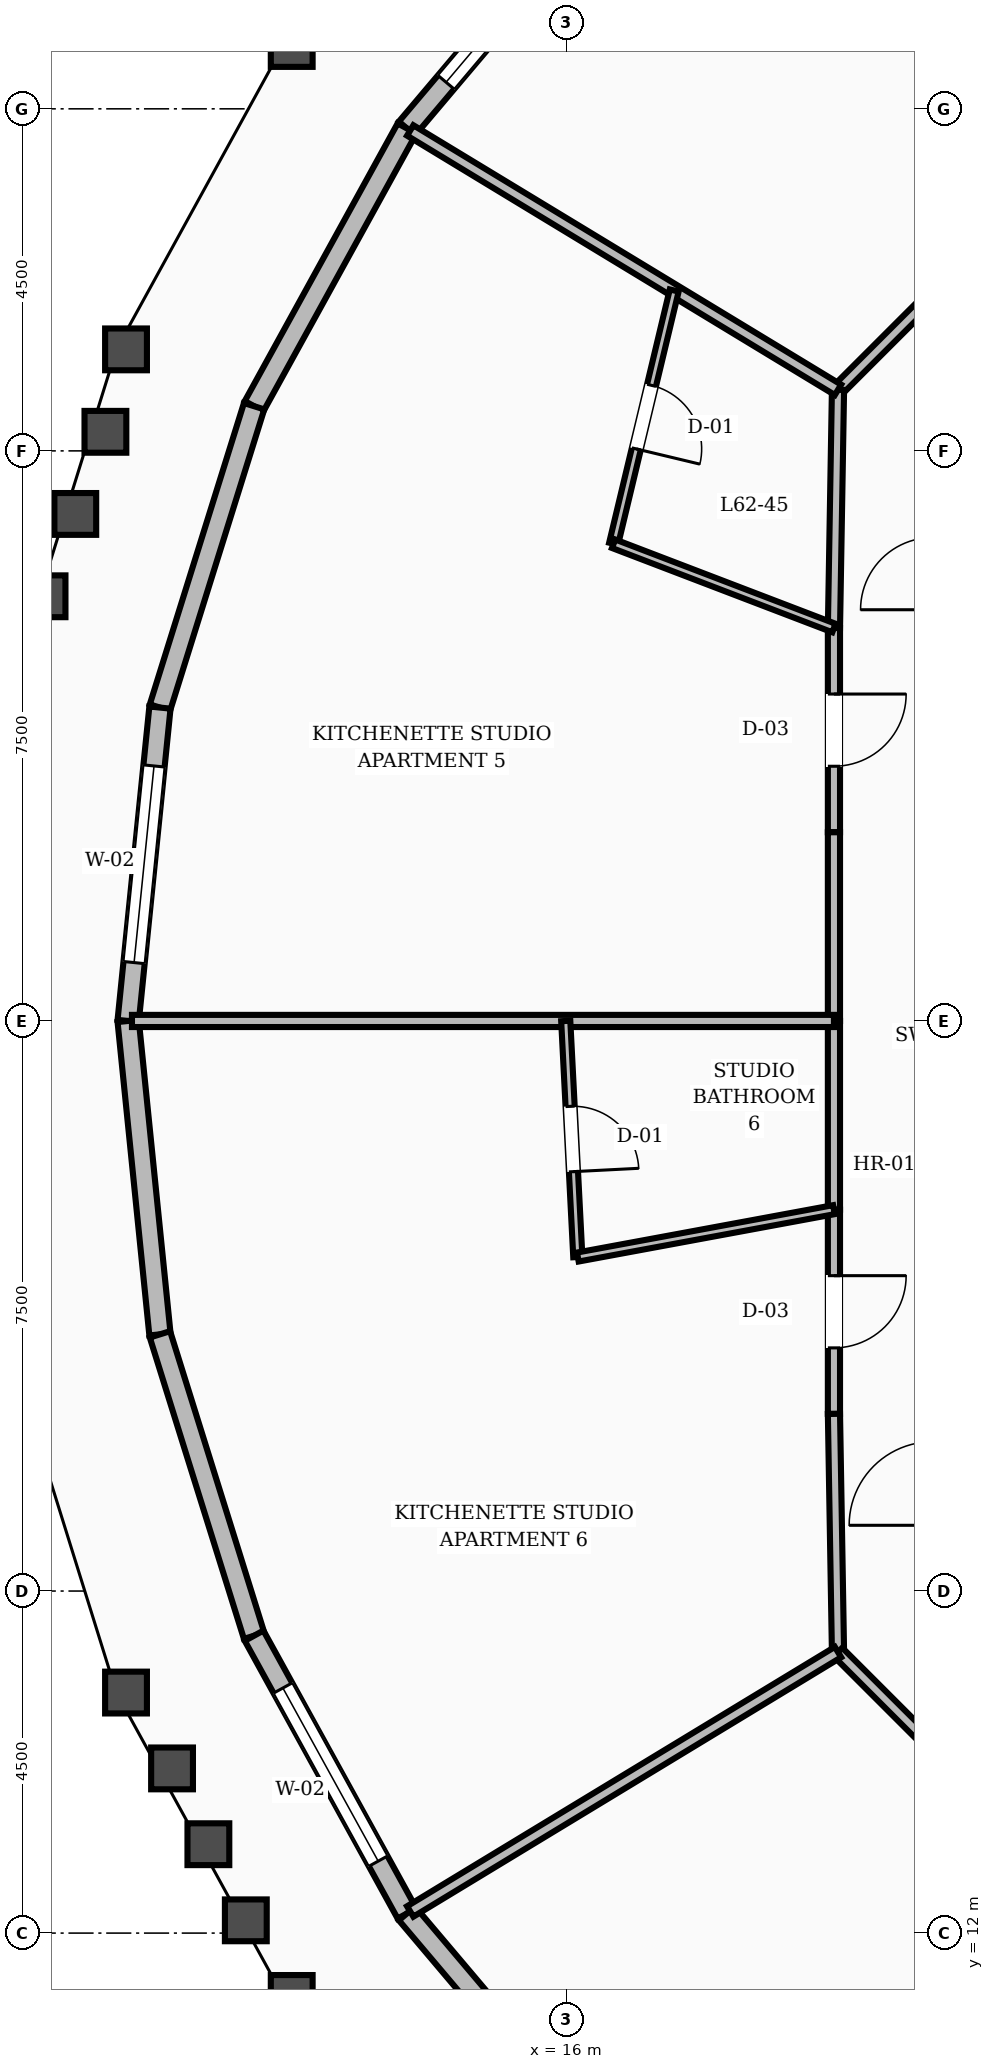
"""IFC4 building model, lengths in metres.
Left out: names, types, materials, properties, quantities, classifications, styles, units other than length and angle.
Written with IfcOpenShell. Run it as: python <this file> out.ifc"""

import sys

from ifc_helpers import new_model, si_unit, direction, frame, frame_2d, origin, place, context, subcontext, project, spatial, rectangle, extrude, element, fill, save


model = new_model("IFC4")
c1 = context("Model", 3, precision=1e-05, world=origin(), true_north=direction((0.0, 1.0)))
c2 = subcontext(c1, "Body", "Model", "MODEL_VIEW")
j1 = project(units=[si_unit("LENGTHUNIT", "METRE"), si_unit("PLANEANGLEUNIT", "RADIAN")], contexts=[c1])
p1 = place(None, origin())
s1 = spatial("IfcSite", under=j1, at=p1, CompositionType="ELEMENT")
p2 = place(p1, origin())
s2 = spatial("IfcBuilding", under=s1, at=p2, CompositionType="ELEMENT")
p3 = place(p2, frame((0.0, 0.0, 240.0)))
s3 = spatial("IfcBuildingStorey", under=s2, at=p3, CompositionType="ELEMENT", Elevation=240.0)
p4 = place(p3, frame((16.61, 38.944, 0.0), z_axis=(0.0, 0.0, 1.0), x_axis=(-0.645568939202, -0.763701999956, 0.0)))
e1 = element("IfcWall", 1, at=p4, inside=s3, PredefinedType="STANDARD", context=c2, shape_type="SweptSolid", body=[
    extrude(rectangle(XDim=4.193, YDim=0.28, at=frame_2d((2.097, 0.0))), origin(), (0.0, 0.0, 1.0), 2.88),
])
p5 = place(p4, frame((0.797, 0.0, 0.8)))
e2 = element("IfcOpeningElement", 2, at=p5, cuts=e1, PredefinedType="OPENING", context=c2, shape_type="SweptSolid", body=[
    extrude(rectangle(XDim=2.6, YDim=1.65, at=frame_2d((1.3, 0.825))), frame((0.0, 0.15, 0.0), z_axis=(0.0, -1.0, 0.0), x_axis=(1.0, 0.0, 0.0)), (0.0, 0.0, 1.0), 0.3),
])
p6 = place(p3, frame((13.903, 35.741, 0.0), z_axis=(0.0, 0.0, 1.0), x_axis=(-0.482219827967, -0.876050248282, 0.0)))
e3 = element("IfcWall", 3, at=p6, inside=s3, PredefinedType="STANDARD", context=c2, shape_type="SweptSolid", body=[
    extrude(rectangle(XDim=4.171, YDim=0.28, at=frame_2d((2.085, 0.0))), origin(), (0.0, 0.0, 1.0), 2.88),
])
p7 = place(p3, frame((11.891, 32.088, 0.0), z_axis=(0.0, 0.0, 1.0), x_axis=(-0.298184627307, -0.954508212661, 0.0)))
e4 = element("IfcWall", 4, at=p7, inside=s3, PredefinedType="STANDARD", context=c2, shape_type="SweptSolid", body=[
    extrude(rectangle(XDim=4.154, YDim=0.28, at=frame_2d((2.077, 0.0))), origin(), (0.0, 0.0, 1.0), 2.88),
])
p8 = place(p3, frame((10.653, 28.123, 0.0), z_axis=(0.0, 0.0, 1.0), x_axis=(-0.100915158401, -0.994895035069, 0.0)))
e5 = element("IfcWall", 5, at=p8, inside=s3, PredefinedType="STANDARD", context=c2, shape_type="SweptSolid", body=[
    extrude(rectangle(XDim=4.144, YDim=0.28, at=frame_2d((2.072, 0.0))), origin(), (0.0, 0.0, 1.0), 2.88),
])
p9 = place(p8, frame((0.772, 0.0, 0.8)))
e6 = element("IfcOpeningElement", 6, at=p9, cuts=e5, PredefinedType="OPENING", context=c2, shape_type="SweptSolid", body=[
    extrude(rectangle(XDim=2.6, YDim=1.65, at=frame_2d((1.3, 0.825))), frame((0.0, 0.15, 0.0), z_axis=(0.0, -1.0, 0.0), x_axis=(1.0, 0.0, 0.0)), (0.0, 0.0, 1.0), 0.3),
])
p10 = place(p3, frame((10.235, 24.0, 0.0), z_axis=(0.0, 0.0, 1.0), x_axis=(0.100915158401, -0.994895035069, 0.0)))
e7 = element("IfcWall", 7, at=p10, inside=s3, PredefinedType="STANDARD", context=c2, shape_type="SweptSolid", body=[
    extrude(rectangle(XDim=4.144, YDim=0.28, at=frame_2d((2.072, 0.0))), origin(), (0.0, 0.0, 1.0), 2.88),
])
p11 = place(p3, frame((10.653, 19.877, 0.0), z_axis=(0.0, 0.0, 1.0), x_axis=(0.298184627307, -0.954508212661, 0.0)))
e8 = element("IfcWall", 8, at=p11, inside=s3, PredefinedType="STANDARD", context=c2, shape_type="SweptSolid", body=[
    extrude(rectangle(XDim=4.154, YDim=0.28, at=frame_2d((2.077, 0.0))), origin(), (0.0, 0.0, 1.0), 2.88),
])
p12 = place(p3, frame((11.891, 15.912, 0.0), z_axis=(0.0, 0.0, 1.0), x_axis=(0.482219827967, -0.876050248282, 0.0)))
e9 = element("IfcWall", 9, at=p12, inside=s3, PredefinedType="STANDARD", context=c2, shape_type="SweptSolid", body=[
    extrude(rectangle(XDim=4.171, YDim=0.28, at=frame_2d((2.085, 0.0))), origin(), (0.0, 0.0, 1.0), 2.88),
])
p13 = place(p12, frame((0.785, 0.0, 0.8)))
e10 = element("IfcOpeningElement", 10, at=p13, cuts=e9, PredefinedType="OPENING", context=c2, shape_type="SweptSolid", body=[
    extrude(rectangle(XDim=2.6, YDim=1.65, at=frame_2d((1.3, 0.825))), frame((0.0, 0.15, 0.0), z_axis=(0.0, -1.0, 0.0), x_axis=(1.0, 0.0, 0.0)), (0.0, 0.0, 1.0), 0.3),
])
p14 = place(p3, frame((13.903, 12.259, 0.0), z_axis=(0.0, 0.0, 1.0), x_axis=(0.645568939202, -0.763701999956, 0.0)))
e11 = element("IfcWall", 11, at=p14, inside=s3, PredefinedType="STANDARD", context=c2, shape_type="SweptSolid", body=[
    extrude(rectangle(XDim=4.193, YDim=0.28, at=frame_2d((2.097, 0.0))), origin(), (0.0, 0.0, 1.0), 2.88),
])
p15 = place(p3, frame((21.635, 34.365, 0.0), z_axis=(0.0, 0.0, 1.0), x_axis=(-0.707106781187, -0.707106781187, 0.0)))
e12 = element("IfcWall", 12, at=p15, inside=s3, PredefinedType="SOLIDWALL", context=c2, shape_type="SweptSolid", body=[
    extrude(rectangle(XDim=2.916, YDim=0.16, at=frame_2d((1.458, 0.0))), origin(), (0.0, 0.0, 1.0), 2.87),
])
p16 = place(p3, frame((19.573, 32.303, 0.0), z_axis=(0.0, 0.0, 1.0), x_axis=(-0.016981035134, -0.999855811828, 0.0)))
e13 = element("IfcWall", 13, at=p16, inside=s3, PredefinedType="SOLIDWALL", context=c2, shape_type="SweptSolid", body=[
    extrude(rectangle(XDim=3.134, YDim=0.16, at=frame_2d((1.567, 0.0))), origin(), (0.0, 0.0, 1.0), 2.87),
])
p17 = place(p3, frame((19.52, 29.169, 0.0), z_axis=(0.0, 0.0, 1.0), x_axis=(0.0, -1.0, 0.0)))
e14 = element("IfcWall", 14, at=p17, inside=s3, PredefinedType="SOLIDWALL", context=c2, shape_type="SweptSolid", body=[
    extrude(rectangle(XDim=2.687, YDim=0.16, at=frame_2d((1.344, 0.0))), origin(), (0.0, 0.0, 1.0), 2.87),
])
p18 = place(p17, frame((0.868, 0.0, 0.0)))
e15 = element("IfcOpeningElement", 15, at=p18, cuts=e14, PredefinedType="OPENING", context=c2, shape_type="SweptSolid", body=[
    extrude(rectangle(XDim=0.95, YDim=2.1, at=frame_2d((0.475, 1.05))), frame((0.0, 0.09, 0.0), z_axis=(0.0, -1.0, 0.0), x_axis=(1.0, 0.0, 0.0)), (0.0, 0.0, 1.0), 0.18),
])
for number, where, z_axis, x_axis in (
    (16, (19.52, 26.482, 0.0), (0.0, 0.0, 1.0), (0.0, -1.0, 0.0)),
    (17, (19.52, 24.0, 0.0), (0.0, 0.0, 1.0), (0.0, -1.0, 0.0)),
):
    element("IfcWall", number, at=place(p3, frame(where, z_axis=z_axis, x_axis=x_axis)), inside=s3, PredefinedType="SOLIDWALL", context=c2, shape_type="SweptSolid", body=[
        extrude(rectangle(XDim=2.482, YDim=0.16, at=frame_2d((1.241, 0.0))), origin(), (0.0, 0.0, 1.0), 2.87),
    ])
p19 = place(p3, frame((19.52, 21.518, 0.0), z_axis=(0.0, 0.0, 1.0), x_axis=(0.0, -1.0, 0.0)))
e18 = element("IfcWall", 18, at=p19, inside=s3, PredefinedType="SOLIDWALL", context=c2, shape_type="SweptSolid", body=[
    extrude(rectangle(XDim=2.687, YDim=0.16, at=frame_2d((1.344, 0.0))), origin(), (0.0, 0.0, 1.0), 2.87),
])
p20 = place(p19, frame((0.868, 0.0, 0.0)))
e19 = element("IfcOpeningElement", 19, at=p20, cuts=e18, PredefinedType="OPENING", context=c2, shape_type="SweptSolid", body=[
    extrude(rectangle(XDim=0.95, YDim=2.1, at=frame_2d((0.475, 1.05))), frame((0.0, 0.09, 0.0), z_axis=(0.0, -1.0, 0.0), x_axis=(1.0, 0.0, 0.0)), (0.0, 0.0, 1.0), 0.18),
])
p21 = place(p3, frame((19.52, 18.831, 0.0), z_axis=(0.0, 0.0, 1.0), x_axis=(0.016981035134, -0.999855811828, 0.0)))
e20 = element("IfcWall", 20, at=p21, inside=s3, PredefinedType="SOLIDWALL", context=c2, shape_type="SweptSolid", body=[
    extrude(rectangle(XDim=3.134, YDim=0.16, at=frame_2d((1.567, 0.0))), origin(), (0.0, 0.0, 1.0), 2.87),
])
p22 = place(p3, frame((19.573, 15.697, 0.0), z_axis=(0.0, 0.0, 1.0), x_axis=(0.707106781187, -0.707106781187, 0.0)))
e21 = element("IfcWall", 21, at=p22, inside=s3, PredefinedType="SOLIDWALL", context=c2, shape_type="SweptSolid", body=[
    extrude(rectangle(XDim=2.916, YDim=0.16, at=frame_2d((1.458, 0.0))), origin(), (0.0, 0.0, 1.0), 2.87),
])
p23 = place(p3, frame((19.573, 32.303, 0.0), z_axis=(0.0, 0.0, 1.0), x_axis=(-0.855087696753, 0.518483394973, 0.0)))
e22 = element("IfcWall", 22, at=p23, inside=s3, PredefinedType="SOLIDWALL", context=c2, shape_type="SweptSolid", body=[
    extrude(rectangle(XDim=6.581, YDim=0.16, at=frame_2d((3.291, 0.0))), origin(), (0.0, 0.0, 1.0), 2.87),
])
p24 = place(p3, frame((17.418, 33.61, 0.0), z_axis=(0.0, 0.0, 1.0), x_axis=(-0.232763726017, -0.97253331452, 0.0)))
e23 = element("IfcWall", 23, at=p24, inside=s3, PredefinedType="PARTITIONING", context=c2, shape_type="SweptSolid", body=[
    extrude(rectangle(XDim=3.426, YDim=0.12, at=frame_2d((1.713, 0.0))), origin(), (0.0, 0.0, 1.0), 2.87),
])
p25 = place(p24, frame((1.283, 0.0, 0.0)))
e24 = element("IfcOpeningElement", 24, at=p25, cuts=e23, PredefinedType="OPENING", context=c2, shape_type="SweptSolid", body=[
    extrude(rectangle(XDim=0.86, YDim=2.1, at=frame_2d((0.43, 1.05))), frame((0.0, 0.07, 0.0), z_axis=(0.0, -1.0, 0.0), x_axis=(1.0, 0.0, 0.0)), (0.0, 0.0, 1.0), 0.14),
])
p26 = place(p3, frame((19.52, 29.169, 0.0), z_axis=(0.0, 0.0, 1.0), x_axis=(-0.934000889724, 0.357270678889, 0.0)))
e25 = element("IfcWall", 25, at=p26, inside=s3, PredefinedType="PARTITIONING", context=c2, shape_type="SweptSolid", body=[
    extrude(rectangle(XDim=3.104, YDim=0.12, at=frame_2d((1.552, 0.0))), origin(), (0.0, 0.0, 1.0), 2.87),
])
p27 = place(p3, frame((19.52, 24.0, 0.0), z_axis=(0.0, 0.0, 1.0), x_axis=(-1.0, 0.0, 0.0)))
e26 = element("IfcWall", 26, at=p27, inside=s3, PredefinedType="SOLIDWALL", context=c2, shape_type="SweptSolid", body=[
    extrude(rectangle(XDim=9.235, YDim=0.16, at=frame_2d((4.618, 0.0))), origin(), (0.0, 0.0, 1.0), 2.87),
])
p28 = place(p3, frame((15.991, 24.0, 0.0), z_axis=(0.0, 0.0, 1.0), x_axis=(0.051108341929, -0.998693114718, 0.0)))
e27 = element("IfcWall", 27, at=p28, inside=s3, PredefinedType="PARTITIONING", context=c2, shape_type="SweptSolid", body=[
    extrude(rectangle(XDim=3.11, YDim=0.12, at=frame_2d((1.555, 0.0))), origin(), (0.0, 0.0, 1.0), 2.87),
])
p29 = place(p28, frame((1.125, 0.0, 0.0)))
e28 = element("IfcOpeningElement", 28, at=p29, cuts=e27, PredefinedType="OPENING", context=c2, shape_type="SweptSolid", body=[
    extrude(rectangle(XDim=0.86, YDim=2.1, at=frame_2d((0.43, 1.05))), frame((0.0, 0.07, 0.0), z_axis=(0.0, -1.0, 0.0), x_axis=(1.0, 0.0, 0.0)), (0.0, 0.0, 1.0), 0.14),
])
p30 = place(p3, frame((19.52, 21.518, 0.0), z_axis=(0.0, 0.0, 1.0), x_axis=(-0.983319307479, -0.181887711346, 0.0)))
e29 = element("IfcWall", 29, at=p30, inside=s3, PredefinedType="PARTITIONING", context=c2, shape_type="SweptSolid", body=[
    extrude(rectangle(XDim=3.427, YDim=0.12, at=frame_2d((1.713, 0.0))), origin(), (0.0, 0.0, 1.0), 2.87),
])
p31 = place(p3, frame((19.573, 15.697, 0.0), z_axis=(0.0, 0.0, 1.0), x_axis=(-0.855087696753, -0.518483394973, 0.0)))
e30 = element("IfcWall", 30, at=p31, inside=s3, PredefinedType="SOLIDWALL", context=c2, shape_type="SweptSolid", body=[
    extrude(rectangle(XDim=6.581, YDim=0.16, at=frame_2d((3.291, 0.0))), origin(), (0.0, 0.0, 1.0), 2.87),
])
p32 = place(p5, origin())
e31 = element("IfcWindow", 31, at=p32, inside=s3, PartitioningType="SINGLE_PANEL", PredefinedType="WINDOW", context=c2, shape_type="SweptSolid", body=[
    extrude(rectangle(XDim=2.6, YDim=1.65, at=frame_2d((1.3, 0.825))), frame((0.0, 0.03, 0.0), z_axis=(0.0, -1.0, 0.0), x_axis=(1.0, 0.0, 0.0)), (0.0, 0.0, 1.0), 0.06),
])
fill(e2, e31)
p33 = place(p9, origin())
e32 = element("IfcWindow", 32, at=p33, inside=s3, PartitioningType="SINGLE_PANEL", PredefinedType="WINDOW", context=c2, shape_type="SweptSolid", body=[
    extrude(rectangle(XDim=2.6, YDim=1.65, at=frame_2d((1.3, 0.825))), frame((0.0, 0.03, 0.0), z_axis=(0.0, -1.0, 0.0), x_axis=(1.0, 0.0, 0.0)), (0.0, 0.0, 1.0), 0.06),
])
fill(e6, e32)
p34 = place(p13, origin())
e33 = element("IfcWindow", 33, at=p34, inside=s3, PartitioningType="SINGLE_PANEL", PredefinedType="WINDOW", context=c2, shape_type="SweptSolid", body=[
    extrude(rectangle(XDim=2.6, YDim=1.65, at=frame_2d((1.3, 0.825))), frame((0.0, 0.03, 0.0), z_axis=(0.0, -1.0, 0.0), x_axis=(1.0, 0.0, 0.0)), (0.0, 0.0, 1.0), 0.06),
])
fill(e10, e33)
p35 = place(p25, origin())
e34 = element("IfcDoor", 34, at=p35, inside=s3, OperationType="SINGLE_SWING_RIGHT", PredefinedType="DOOR", context=c2, shape_type="SweptSolid", body=[
    extrude(rectangle(XDim=0.86, YDim=2.1, at=frame_2d((0.43, 1.05))), frame((0.0, 0.025, 0.0), z_axis=(0.0, -1.0, 0.0), x_axis=(1.0, 0.0, 0.0)), (0.0, 0.0, 1.0), 0.05),
])
fill(e24, e34)
p36 = place(p18, origin())
e35 = element("IfcDoor", 35, at=p36, inside=s3, OperationType="SINGLE_SWING_LEFT", PredefinedType="DOOR", context=c2, shape_type="SweptSolid", body=[
    extrude(rectangle(XDim=0.95, YDim=2.1, at=frame_2d((0.475, 1.05))), frame((0.0, 0.025, 0.0), z_axis=(0.0, -1.0, 0.0), x_axis=(1.0, 0.0, 0.0)), (0.0, 0.0, 1.0), 0.05),
])
fill(e15, e35)
p37 = place(p29, origin())
e36 = element("IfcDoor", 36, at=p37, inside=s3, OperationType="SINGLE_SWING_RIGHT", PredefinedType="DOOR", context=c2, shape_type="SweptSolid", body=[
    extrude(rectangle(XDim=0.86, YDim=2.1, at=frame_2d((0.43, 1.05))), frame((0.0, 0.025, 0.0), z_axis=(0.0, -1.0, 0.0), x_axis=(1.0, 0.0, 0.0)), (0.0, 0.0, 1.0), 0.05),
])
fill(e28, e36)
p38 = place(p20, origin())
e37 = element("IfcDoor", 37, at=p38, inside=s3, OperationType="SINGLE_SWING_LEFT", PredefinedType="DOOR", context=c2, shape_type="SweptSolid", body=[
    extrude(rectangle(XDim=0.95, YDim=2.1, at=frame_2d((0.475, 1.05))), frame((0.0, 0.025, 0.0), z_axis=(0.0, -1.0, 0.0), x_axis=(1.0, 0.0, 0.0)), (0.0, 0.0, 1.0), 0.05),
])
fill(e19, e37)
save(model, sys.argv[1])
